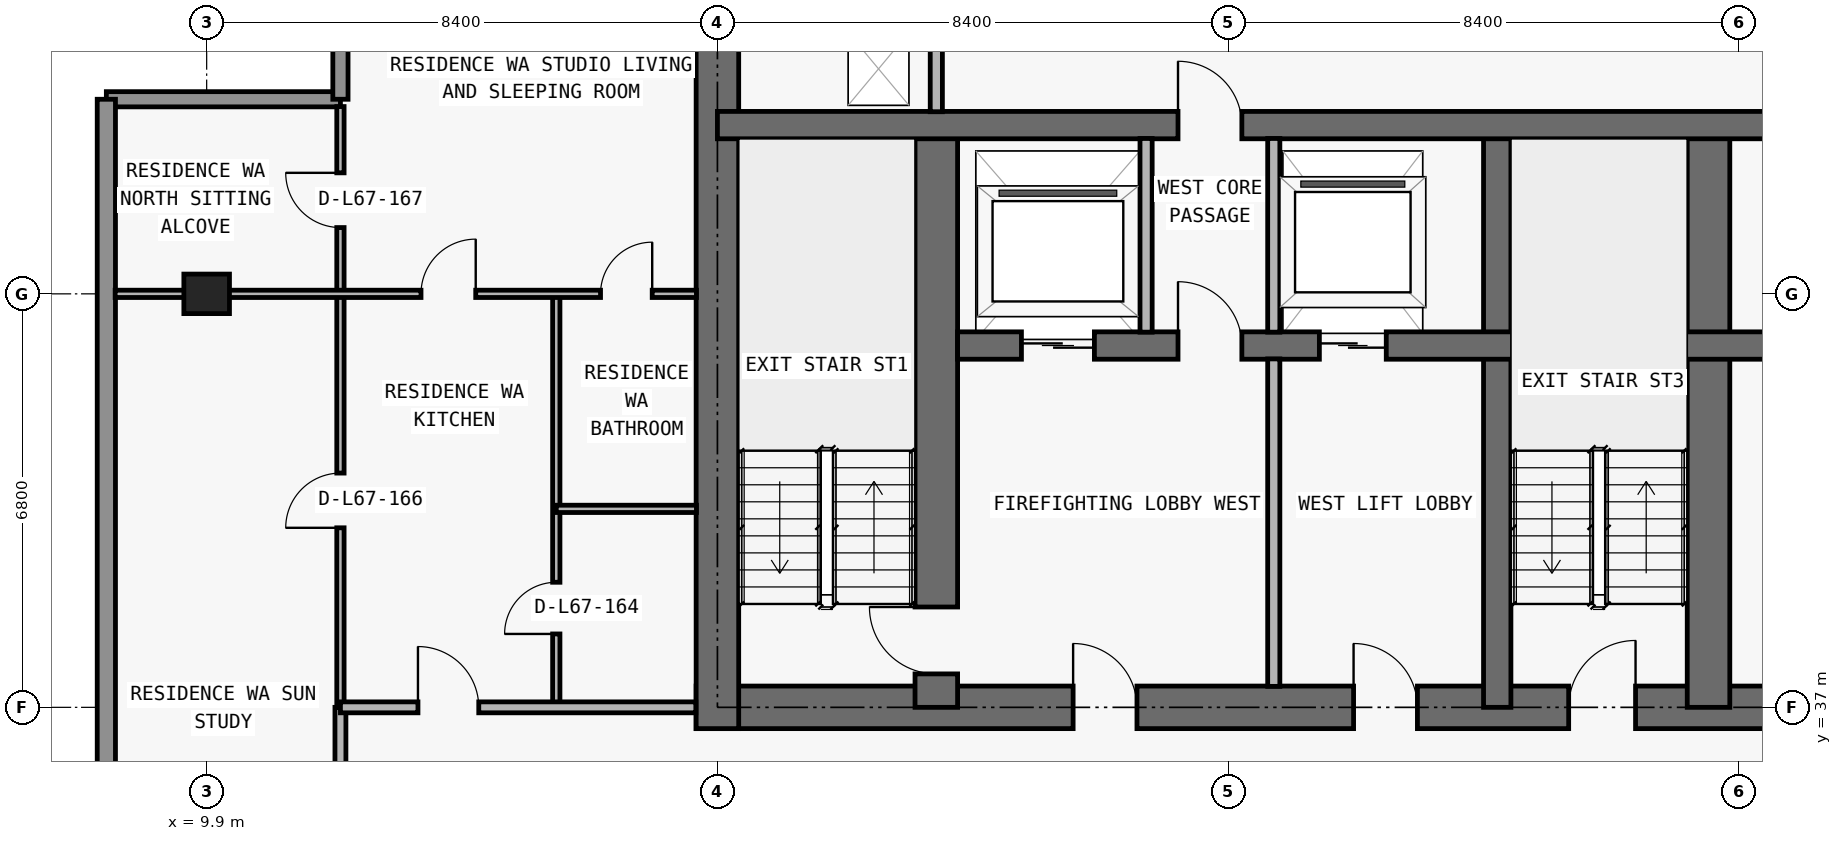
"""IFC4 building model, lengths in metres.
Left out: names, types, materials, properties, quantities, classifications, styles, units other than length and angle.
Written with IfcOpenShell. Run it as: python <this file> out.ifc"""

import sys

from ifc_helpers import new_model, si_unit, direction, frame, frame_2d, origin, origin_2d, place, context, subcontext, project, spatial, rectangle, extrude, element, fill, save


model = new_model("IFC4")
c1 = context("Model", 3, precision=1e-05, world=origin(), true_north=direction((0.0, 1.0)))
c2 = subcontext(c1, "Body", "Model", "MODEL_VIEW")
j1 = project(units=[si_unit("LENGTHUNIT", "METRE"), si_unit("PLANEANGLEUNIT", "RADIAN")], contexts=[c1])
p1 = place(None, origin())
s1 = spatial("IfcSite", under=j1, at=p1, CompositionType="ELEMENT")
p2 = place(p1, origin())
s2 = spatial("IfcBuilding", under=s1, at=p2, CompositionType="ELEMENT")
p3 = place(p2, frame((0.0, 0.0, 239.7)))
s3 = spatial("IfcBuildingStorey", under=s2, at=p3, CompositionType="ELEMENT", Elevation=239.7)
p4 = place(p3, frame((9.9, 43.8, 0.0), z_axis=(0.0, 0.0, 1.0), x_axis=(1.0, 0.0, 0.0)))
e1 = element("IfcColumn", 1, at=p4, inside=s3, PredefinedType="COLUMN", context=c2, shape_type="SweptSolid", body=[
    extrude(rectangle(XDim=0.75, YDim=0.65, at=origin_2d()), origin(), (0.0, 0.0, 1.0), 3.05),
])
p5 = place(p3, frame((17.95, 37.0, 0.0), z_axis=(0.0, 0.0, 1.0), x_axis=(1.0, 0.0, 0.0)))
e2 = element("IfcWall", 2, at=p5, inside=s3, PredefinedType="SHEAR", context=c2, shape_type="SweptSolid", body=[
    extrude(rectangle(XDim=41.9, YDim=0.7, at=frame_2d((20.95, 0.0))), origin(), (0.0, 0.0, 1.0), 3.05),
])
p6 = place(p5, frame((14.35, 0.0, 0.0)))
e3 = element("IfcOpeningElement", 3, at=p6, cuts=e2, PredefinedType="OPENING", context=c2, shape_type="SweptSolid", body=[
    extrude(rectangle(XDim=1.1, YDim=2.15, at=frame_2d((0.55, 1.075))), frame((0.0, 0.36, 0.0), z_axis=(0.0, -1.0, 0.0), x_axis=(1.0, 0.0, 0.0)), (0.0, 0.0, 1.0), 0.72),
])
p7 = place(p5, frame((6.2, 0.0, 0.0)))
e4 = element("IfcOpeningElement", 4, at=p7, cuts=e2, PredefinedType="OPENING", context=c2, shape_type="SweptSolid", body=[
    extrude(rectangle(XDim=1.05, YDim=2.15, at=frame_2d((0.525, 1.075))), frame((0.0, 0.36, 0.0), z_axis=(0.0, -1.0, 0.0), x_axis=(1.0, 0.0, 0.0)), (0.0, 0.0, 1.0), 0.72),
])
p8 = place(p5, frame((34.7, 0.0, 0.0)))
e5 = element("IfcOpeningElement", 5, at=p8, cuts=e2, PredefinedType="OPENING", context=c2, shape_type="SweptSolid", body=[
    extrude(rectangle(XDim=1.05, YDim=2.15, at=frame_2d((0.525, 1.075))), frame((0.0, 0.36, 0.0), z_axis=(0.0, -1.0, 0.0), x_axis=(1.0, 0.0, 0.0)), (0.0, 0.0, 1.0), 0.72),
])
p9 = place(p5, frame((10.812, 0.0, 0.0)))
e6 = element("IfcOpeningElement", 6, at=p9, cuts=e2, PredefinedType="OPENING", context=c2, shape_type="SweptSolid", body=[
    extrude(rectangle(XDim=1.05, YDim=2.15, at=frame_2d((0.525, 1.075))), frame((0.0, 0.36, 0.0), z_axis=(0.0, -1.0, 0.0), x_axis=(1.0, 0.0, 0.0)), (0.0, 0.0, 1.0), 0.72),
])
p10 = place(p5, frame((24.05, 0.0, 0.0)))
e7 = element("IfcOpeningElement", 7, at=p10, cuts=e2, PredefinedType="OPENING", context=c2, shape_type="SweptSolid", body=[
    extrude(rectangle(XDim=1.05, YDim=2.15, at=frame_2d((0.525, 1.075))), frame((0.0, 0.36, 0.0), z_axis=(0.0, -1.0, 0.0), x_axis=(1.0, 0.0, 0.0)), (0.0, 0.0, 1.0), 0.72),
])
p11 = place(p3, frame((18.3, 36.65, 0.0), z_axis=(0.0, 0.0, 1.0), x_axis=(0.0, 1.0, 0.0)))
e8 = element("IfcWall", 8, at=p11, inside=s3, PredefinedType="SHEAR", context=c2, shape_type="SweptSolid", body=[
    extrude(rectangle(XDim=13.95, YDim=0.7, at=frame_2d((6.975, 0.0))), origin(), (0.0, 0.0, 1.0), 3.05),
])
p12 = place(p3, frame((21.9, 37.0, 0.0), z_axis=(0.0, 0.0, 1.0), x_axis=(0.0, 1.0, 0.0)))
e9 = element("IfcWall", 9, at=p12, inside=s3, PredefinedType="SHEAR", context=c2, shape_type="SweptSolid", body=[
    extrude(rectangle(XDim=9.575, YDim=0.7, at=frame_2d((4.788, 0.0))), origin(), (0.0, 0.0, 1.0), 3.05),
])
p13 = place(p12, frame((0.55, 0.0, 0.0)))
e10 = element("IfcOpeningElement", 10, at=p13, cuts=e9, PredefinedType="OPENING", context=c2, shape_type="SweptSolid", body=[
    extrude(rectangle(XDim=1.1, YDim=2.15, at=frame_2d((0.55, 1.075))), frame((0.0, 0.36, 0.0), z_axis=(0.0, -1.0, 0.0), x_axis=(1.0, 0.0, 0.0)), (0.0, 0.0, 1.0), 0.72),
])
p14 = place(p3, frame((31.125, 37.0, 0.0), z_axis=(0.0, 0.0, 1.0), x_axis=(0.0, 1.0, 0.0)))
e11 = element("IfcWall", 11, at=p14, inside=s3, PredefinedType="SHEAR", context=c2, shape_type="SweptSolid", body=[
    extrude(rectangle(XDim=9.575, YDim=0.45, at=frame_2d((4.788, 0.0))), origin(), (0.0, 0.0, 1.0), 3.05),
])
p15 = place(p3, frame((34.6, 37.0, 0.0), z_axis=(0.0, 0.0, 1.0), x_axis=(0.0, 1.0, 0.0)))
e12 = element("IfcWall", 12, at=p15, inside=s3, PredefinedType="SHEAR", context=c2, shape_type="SweptSolid", body=[
    extrude(rectangle(XDim=9.575, YDim=0.7, at=frame_2d((4.788, 0.0))), origin(), (0.0, 0.0, 1.0), 3.05),
])
p16 = place(p3, frame((22.25, 42.95, 0.0), z_axis=(0.0, 0.0, 1.0), x_axis=(1.0, 0.0, 0.0)))
e13 = element("IfcWall", 13, at=p16, inside=s3, PredefinedType="SHEAR", context=c2, shape_type="SweptSolid", body=[
    extrude(rectangle(XDim=33.3, YDim=0.45, at=frame_2d((16.65, 0.0))), origin(), (0.0, 0.0, 1.0), 3.05),
])
p17 = place(p16, frame((1.05, 0.0, 0.0)))
e14 = element("IfcOpeningElement", 14, at=p17, cuts=e13, PredefinedType="OPENING", context=c2, shape_type="SweptSolid", body=[
    extrude(rectangle(XDim=1.2, YDim=2.2, at=frame_2d((0.6, 1.1))), frame((0.0, 0.235, 0.0), z_axis=(0.0, -1.0, 0.0), x_axis=(1.0, 0.0, 0.0)), (0.0, 0.0, 1.0), 0.47),
])
p18 = place(p16, frame((31.05, 0.0, 0.0)))
e15 = element("IfcOpeningElement", 15, at=p18, cuts=e13, PredefinedType="OPENING", context=c2, shape_type="SweptSolid", body=[
    extrude(rectangle(XDim=1.2, YDim=2.2, at=frame_2d((0.6, 1.1))), frame((0.0, 0.235, 0.0), z_axis=(0.0, -1.0, 0.0), x_axis=(1.0, 0.0, 0.0)), (0.0, 0.0, 1.0), 0.47),
])
p19 = place(p16, frame((26.45, 0.0, 0.0)))
e16 = element("IfcOpeningElement", 16, at=p19, cuts=e13, PredefinedType="OPENING", context=c2, shape_type="SweptSolid", body=[
    extrude(rectangle(XDim=1.1, YDim=2.2, at=frame_2d((0.55, 1.1))), frame((0.0, 0.235, 0.0), z_axis=(0.0, -1.0, 0.0), x_axis=(1.0, 0.0, 0.0)), (0.0, 0.0, 1.0), 0.47),
])
p20 = place(p16, frame((5.95, 0.0, 0.0)))
e17 = element("IfcOpeningElement", 17, at=p20, cuts=e13, PredefinedType="OPENING", context=c2, shape_type="SweptSolid", body=[
    extrude(rectangle(XDim=1.1, YDim=2.2, at=frame_2d((0.55, 1.1))), frame((0.0, 0.235, 0.0), z_axis=(0.0, -1.0, 0.0), x_axis=(1.0, 0.0, 0.0)), (0.0, 0.0, 1.0), 0.47),
])
p21 = place(p16, frame((3.625, 0.0, 0.0)))
e18 = element("IfcOpeningElement", 18, at=p21, cuts=e13, PredefinedType="OPENING", context=c2, shape_type="SweptSolid", body=[
    extrude(rectangle(XDim=1.05, YDim=2.15, at=frame_2d((0.525, 1.075))), frame((0.0, 0.235, 0.0), z_axis=(0.0, -1.0, 0.0), x_axis=(1.0, 0.0, 0.0)), (0.0, 0.0, 1.0), 0.47),
])
p22 = place(p16, frame((28.675, 0.0, 0.0)))
e19 = element("IfcOpeningElement", 19, at=p22, cuts=e13, PredefinedType="OPENING", context=c2, shape_type="SweptSolid", body=[
    extrude(rectangle(XDim=1.05, YDim=2.15, at=frame_2d((0.525, 1.075))), frame((0.0, 0.235, 0.0), z_axis=(0.0, -1.0, 0.0), x_axis=(1.0, 0.0, 0.0)), (0.0, 0.0, 1.0), 0.47),
])
p23 = place(p16, frame((15.225, 0.0, 0.0)))
e20 = element("IfcOpeningElement", 20, at=p23, cuts=e13, PredefinedType="OPENING", context=c2, shape_type="SweptSolid", body=[
    extrude(rectangle(XDim=1.0, YDim=2.2, at=frame_2d((0.5, 1.1))), frame((0.0, 0.235, 0.0), z_axis=(0.0, -1.0, 0.0), x_axis=(1.0, 0.0, 0.0)), (0.0, 0.0, 1.0), 0.47),
])
p24 = place(p16, frame((21.975, 0.0, 0.0)))
e21 = element("IfcOpeningElement", 21, at=p24, cuts=e13, PredefinedType="OPENING", context=c2, shape_type="SweptSolid", body=[
    extrude(rectangle(XDim=1.0, YDim=2.2, at=frame_2d((0.5, 1.1))), frame((0.0, 0.235, 0.0), z_axis=(0.0, -1.0, 0.0), x_axis=(1.0, 0.0, 0.0)), (0.0, 0.0, 1.0), 0.47),
])
p25 = place(p3, frame((18.3, 46.575, 0.0), z_axis=(0.0, 0.0, 1.0), x_axis=(1.0, 0.0, 0.0)))
e22 = element("IfcWall", 22, at=p25, inside=s3, PredefinedType="SHEAR", context=c2, shape_type="SweptSolid", body=[
    extrude(rectangle(XDim=41.2, YDim=0.45, at=frame_2d((20.6, 0.0))), origin(), (0.0, 0.0, 1.0), 3.05),
])
p26 = place(p25, frame((7.575, 0.0, 0.0)))
e23 = element("IfcOpeningElement", 23, at=p26, cuts=e22, PredefinedType="OPENING", context=c2, shape_type="SweptSolid", body=[
    extrude(rectangle(XDim=1.05, YDim=2.15, at=frame_2d((0.525, 1.075))), frame((0.0, 0.235, 0.0), z_axis=(0.0, -1.0, 0.0), x_axis=(1.0, 0.0, 0.0)), (0.0, 0.0, 1.0), 0.47),
])
p27 = place(p25, frame((32.625, 0.0, 0.0)))
e24 = element("IfcOpeningElement", 24, at=p27, cuts=e22, PredefinedType="OPENING", context=c2, shape_type="SweptSolid", body=[
    extrude(rectangle(XDim=1.05, YDim=2.15, at=frame_2d((0.525, 1.075))), frame((0.0, 0.235, 0.0), z_axis=(0.0, -1.0, 0.0), x_axis=(1.0, 0.0, 0.0)), (0.0, 0.0, 1.0), 0.47),
])
p28 = place(p3, frame((8.25, 47.0, 0.0), z_axis=(0.0, 0.0, 1.0), x_axis=(1.0, 0.0, 0.0)))
e25 = element("IfcWall", 25, at=p28, inside=s3, PredefinedType="ELEMENTEDWALL", context=c2, shape_type="SweptSolid", body=[
    extrude(rectangle(XDim=3.85, YDim=0.25, at=frame_2d((1.925, 0.0))), origin(), (0.0, 0.0, 1.0), 3.05),
])
p29 = place(p3, frame((12.1, 47.0, 0.0), z_axis=(0.0, 0.0, 1.0), x_axis=(0.0, 1.0, 0.0)))
e26 = element("IfcWall", 26, at=p29, inside=s3, PredefinedType="ELEMENTEDWALL", context=c2, shape_type="SweptSolid", body=[
    extrude(rectangle(XDim=3.45, YDim=0.25, at=frame_2d((1.725, 0.0))), origin(), (0.0, 0.0, 1.0), 3.05),
])
p30 = place(p3, frame((8.25, 30.15, 0.0), z_axis=(0.0, 0.0, 1.0), x_axis=(0.0, 1.0, 0.0)))
e27 = element("IfcWall", 27, at=p30, inside=s3, PredefinedType="STANDARD", context=c2, shape_type="SweptSolid", body=[
    extrude(rectangle(XDim=16.85, YDim=0.3, at=frame_2d((8.425, 0.0))), origin(), (0.0, 0.0, 1.0), 3.05),
])
p31 = place(p3, frame((12.1, 34.005, 0.0), z_axis=(0.0, 0.0, 1.0), x_axis=(0.0, 1.0, 0.0)))
e28 = element("IfcWall", 28, at=p31, inside=s3, PredefinedType="PARTITIONING", context=c2, shape_type="SweptSolid", body=[
    extrude(rectangle(XDim=2.995, YDim=0.18, at=frame_2d((1.498, 0.0))), origin(), (0.0, 0.0, 1.0), 3.05),
])
p32 = place(p3, frame((12.1, 37.005, 0.0), z_axis=(0.0, 0.0, 1.0), x_axis=(0.0, 1.0, 0.0)))
e29 = element("IfcWall", 29, at=p32, inside=s3, PredefinedType="PARTITIONING", context=c2, shape_type="SweptSolid", body=[
    extrude(rectangle(XDim=9.875, YDim=0.12, at=frame_2d((4.938, 0.0))), origin(), (0.0, 0.0, 1.0), 3.05),
])
p33 = place(p32, frame((2.948, 0.0, 0.0)))
e30 = element("IfcOpeningElement", 30, at=p33, cuts=e29, PredefinedType="OPENING", context=c2, shape_type="SweptSolid", body=[
    extrude(rectangle(XDim=0.9, YDim=2.15, at=frame_2d((0.45, 1.075))), frame((0.0, 0.07, 0.0), z_axis=(0.0, -1.0, 0.0), x_axis=(1.0, 0.0, 0.0)), (0.0, 0.0, 1.0), 0.14),
])
p34 = place(p32, frame((7.885, 0.0, 0.0)))
e31 = element("IfcOpeningElement", 31, at=p34, cuts=e29, PredefinedType="OPENING", context=c2, shape_type="SweptSolid", body=[
    extrude(rectangle(XDim=0.9, YDim=2.15, at=frame_2d((0.45, 1.075))), frame((0.0, 0.07, 0.0), z_axis=(0.0, -1.0, 0.0), x_axis=(1.0, 0.0, 0.0)), (0.0, 0.0, 1.0), 0.14),
])
p35 = place(p3, frame((15.65, 37.0, 0.0), z_axis=(0.0, 0.0, 1.0), x_axis=(0.0, 1.0, 0.0)))
e32 = element("IfcWall", 32, at=p35, inside=s3, PredefinedType="PARTITIONING", context=c2, shape_type="SweptSolid", body=[
    extrude(rectangle(XDim=6.8, YDim=0.12, at=frame_2d((3.4, 0.0))), origin(), (0.0, 0.0, 1.0), 3.05),
])
p36 = place(p35, frame((1.207, 0.0, 0.0)))
e33 = element("IfcOpeningElement", 33, at=p36, cuts=e32, PredefinedType="OPENING", context=c2, shape_type="SweptSolid", body=[
    extrude(rectangle(XDim=0.85, YDim=2.1, at=frame_2d((0.425, 1.05))), frame((0.0, 0.07, 0.0), z_axis=(0.0, -1.0, 0.0), x_axis=(1.0, 0.0, 0.0)), (0.0, 0.0, 1.0), 0.14),
])
p37 = place(p3, frame((21.9, 46.795, 0.0), z_axis=(0.0, 0.0, 1.0), x_axis=(0.0, 1.0, 0.0)))
e34 = element("IfcWall", 34, at=p37, inside=s3, PredefinedType="PARTITIONING", context=c2, shape_type="SweptSolid", body=[
    extrude(rectangle(XDim=3.16, YDim=0.2, at=frame_2d((1.58, 0.0))), origin(), (0.0, 0.0, 1.0), 3.05),
])
p38 = place(p3, frame((25.35, 43.17, 0.0), z_axis=(0.0, 0.0, 1.0), x_axis=(0.0, 1.0, 0.0)))
e35 = element("IfcWall", 35, at=p38, inside=s3, PredefinedType="PARTITIONING", context=c2, shape_type="SweptSolid", body=[
    extrude(rectangle(XDim=3.185, YDim=0.2, at=frame_2d((1.593, 0.0))), origin(), (0.0, 0.0, 1.0), 3.05),
])
p39 = place(p3, frame((27.45, 37.345, 0.0), z_axis=(0.0, 0.0, 1.0), x_axis=(0.0, 1.0, 0.0)))
e36 = element("IfcWall", 36, at=p39, inside=s3, PredefinedType="PARTITIONING", context=c2, shape_type="SweptSolid", body=[
    extrude(rectangle(XDim=5.385, YDim=0.2, at=frame_2d((2.692, 0.0))), origin(), (0.0, 0.0, 1.0), 3.05),
])
p40 = place(p3, frame((27.45, 43.17, 0.0), z_axis=(0.0, 0.0, 1.0), x_axis=(0.0, 1.0, 0.0)))
e37 = element("IfcWall", 37, at=p40, inside=s3, PredefinedType="PARTITIONING", context=c2, shape_type="SweptSolid", body=[
    extrude(rectangle(XDim=3.185, YDim=0.2, at=frame_2d((1.593, 0.0))), origin(), (0.0, 0.0, 1.0), 3.05),
])
p41 = place(p3, frame((12.1, 37.0, 0.0), z_axis=(0.0, 0.0, 1.0), x_axis=(1.0, 0.0, 0.0)))
e38 = element("IfcWall", 38, at=p41, inside=s3, PredefinedType="PARTITIONING", context=c2, shape_type="SweptSolid", body=[
    extrude(rectangle(XDim=5.845, YDim=0.18, at=frame_2d((2.922, 0.0))), origin(), (0.0, 0.0, 1.0), 3.05),
])
p42 = place(p41, frame((1.275, 0.0, 0.0)))
e39 = element("IfcOpeningElement", 39, at=p42, cuts=e38, PredefinedType="OPENING", context=c2, shape_type="SweptSolid", body=[
    extrude(rectangle(XDim=1.0, YDim=2.2, at=frame_2d((0.5, 1.1))), frame((0.0, 0.1, 0.0), z_axis=(0.0, -1.0, 0.0), x_axis=(1.0, 0.0, 0.0)), (0.0, 0.0, 1.0), 0.2),
])
p43 = place(p3, frame((15.65, 40.264, 0.0), z_axis=(0.0, 0.0, 1.0), x_axis=(1.0, 0.0, 0.0)))
e40 = element("IfcWall", 40, at=p43, inside=s3, PredefinedType="PARTITIONING", context=c2, shape_type="SweptSolid", body=[
    extrude(rectangle(XDim=2.305, YDim=0.12, at=frame_2d((1.153, 0.0))), origin(), (0.0, 0.0, 1.0), 3.05),
])
p44 = place(p3, frame((8.395, 43.8, 0.0), z_axis=(0.0, 0.0, 1.0), x_axis=(1.0, 0.0, 0.0)))
e41 = element("IfcWall", 41, at=p44, inside=s3, PredefinedType="PARTITIONING", context=c2, shape_type="SweptSolid", body=[
    extrude(rectangle(XDim=9.56, YDim=0.12, at=frame_2d((4.78, 0.0))), origin(), (0.0, 0.0, 1.0), 2.418),
])
p45 = place(p44, frame((5.03, 0.0, 0.0)))
e42 = element("IfcOpeningElement", 42, at=p45, cuts=e41, PredefinedType="OPENING", context=c2, shape_type="SweptSolid", body=[
    extrude(rectangle(XDim=0.9, YDim=2.15, at=frame_2d((0.45, 1.075))), frame((0.0, 0.07, 0.0), z_axis=(0.0, -1.0, 0.0), x_axis=(1.0, 0.0, 0.0)), (0.0, 0.0, 1.0), 0.14),
])
p46 = place(p44, frame((7.982, 0.0, 0.0)))
e43 = element("IfcOpeningElement", 43, at=p46, cuts=e41, PredefinedType="OPENING", context=c2, shape_type="SweptSolid", body=[
    extrude(rectangle(XDim=0.85, YDim=2.1, at=frame_2d((0.425, 1.05))), frame((0.0, 0.07, 0.0), z_axis=(0.0, -1.0, 0.0), x_axis=(1.0, 0.0, 0.0)), (0.0, 0.0, 1.0), 0.14),
])
p47 = place(p17, origin())
e44 = element("IfcDoor", 44, at=p47, inside=s3, OperationType="DOUBLE_DOOR_SLIDING", PredefinedType="DOOR", context=c2, shape_type="SweptSolid", body=[
    extrude(rectangle(XDim=1.2, YDim=2.2, at=frame_2d((0.6, 1.1))), frame((0.0, 0.025, 0.0), z_axis=(0.0, -1.0, 0.0), x_axis=(1.0, 0.0, 0.0)), (0.0, 0.0, 1.0), 0.05),
])
fill(e14, e44)
p48 = place(p20, origin())
e45 = element("IfcDoor", 45, at=p48, inside=s3, OperationType="DOUBLE_DOOR_SLIDING", PredefinedType="DOOR", context=c2, shape_type="SweptSolid", body=[
    extrude(rectangle(XDim=1.1, YDim=2.2, at=frame_2d((0.55, 1.1))), frame((0.0, 0.025, 0.0), z_axis=(0.0, -1.0, 0.0), x_axis=(1.0, 0.0, 0.0)), (0.0, 0.0, 1.0), 0.05),
])
fill(e17, e45)
p49 = place(p6, origin())
e46 = element("IfcDoor", 46, at=p49, inside=s3, OperationType="SINGLE_SWING_RIGHT", PredefinedType="DOOR", context=c2, shape_type="SweptSolid", body=[
    extrude(rectangle(XDim=1.1, YDim=2.15, at=frame_2d((0.55, 1.075))), frame((0.0, 0.025, 0.0), z_axis=(0.0, -1.0, 0.0), x_axis=(1.0, 0.0, 0.0)), (0.0, 0.0, 1.0), 0.05),
])
fill(e3, e46)
p50 = place(p7, origin())
e47 = element("IfcDoor", 47, at=p50, inside=s3, OperationType="SINGLE_SWING_LEFT", PredefinedType="DOOR", context=c2, shape_type="SweptSolid", body=[
    extrude(rectangle(XDim=1.05, YDim=2.15, at=frame_2d((0.525, 1.075))), frame((0.0, 0.025, 0.0), z_axis=(0.0, -1.0, 0.0), x_axis=(1.0, 0.0, 0.0)), (0.0, 0.0, 1.0), 0.05),
])
fill(e4, e47)
p51 = place(p13, origin())
e48 = element("IfcDoor", 48, at=p51, inside=s3, OperationType="SINGLE_SWING_RIGHT", PredefinedType="DOOR", context=c2, shape_type="SweptSolid", body=[
    extrude(rectangle(XDim=1.1, YDim=2.15, at=frame_2d((0.55, 1.075))), frame((0.0, 0.025, 0.0), z_axis=(0.0, -1.0, 0.0), x_axis=(1.0, 0.0, 0.0)), (0.0, 0.0, 1.0), 0.05),
])
fill(e10, e48)
p52 = place(p21, origin())
e49 = element("IfcDoor", 49, at=p52, inside=s3, OperationType="SINGLE_SWING_LEFT", PredefinedType="DOOR", context=c2, shape_type="SweptSolid", body=[
    extrude(rectangle(XDim=1.05, YDim=2.15, at=frame_2d((0.525, 1.075))), frame((0.0, 0.025, 0.0), z_axis=(0.0, -1.0, 0.0), x_axis=(1.0, 0.0, 0.0)), (0.0, 0.0, 1.0), 0.05),
])
fill(e18, e49)
p53 = place(p9, origin())
e50 = element("IfcDoor", 50, at=p53, inside=s3, OperationType="SINGLE_SWING_LEFT", PredefinedType="DOOR", context=c2, shape_type="SweptSolid", body=[
    extrude(rectangle(XDim=1.05, YDim=2.15, at=frame_2d((0.525, 1.075))), frame((0.0, 0.025, 0.0), z_axis=(0.0, -1.0, 0.0), x_axis=(1.0, 0.0, 0.0)), (0.0, 0.0, 1.0), 0.05),
])
fill(e6, e50)
p54 = place(p26, origin())
e51 = element("IfcDoor", 51, at=p54, inside=s3, OperationType="SINGLE_SWING_LEFT", PredefinedType="DOOR", context=c2, shape_type="SweptSolid", body=[
    extrude(rectangle(XDim=1.05, YDim=2.15, at=frame_2d((0.525, 1.075))), frame((0.0, 0.025, 0.0), z_axis=(0.0, -1.0, 0.0), x_axis=(1.0, 0.0, 0.0)), (0.0, 0.0, 1.0), 0.05),
])
fill(e23, e51)
p55 = place(p42, origin())
e52 = element("IfcDoor", 52, at=p55, inside=s3, OperationType="SINGLE_SWING_LEFT", PredefinedType="DOOR", context=c2, shape_type="SweptSolid", body=[
    extrude(rectangle(XDim=1.0, YDim=2.2, at=frame_2d((0.5, 1.1))), frame((0.0, 0.025, 0.0), z_axis=(0.0, -1.0, 0.0), x_axis=(1.0, 0.0, 0.0)), (0.0, 0.0, 1.0), 0.05),
])
fill(e39, e52)
p56 = place(p45, origin())
e53 = element("IfcDoor", 53, at=p56, inside=s3, OperationType="SINGLE_SWING_RIGHT", PredefinedType="DOOR", context=c2, shape_type="SweptSolid", body=[
    extrude(rectangle(XDim=0.9, YDim=2.15, at=frame_2d((0.45, 1.075))), frame((0.0, 0.025, 0.0), z_axis=(0.0, -1.0, 0.0), x_axis=(1.0, 0.0, 0.0)), (0.0, 0.0, 1.0), 0.05),
])
fill(e42, e53)
p57 = place(p36, origin())
e54 = element("IfcDoor", 54, at=p57, inside=s3, OperationType="SINGLE_SWING_LEFT", PredefinedType="DOOR", context=c2, shape_type="SweptSolid", body=[
    extrude(rectangle(XDim=0.85, YDim=2.1, at=frame_2d((0.425, 1.05))), frame((0.0, 0.025, 0.0), z_axis=(0.0, -1.0, 0.0), x_axis=(1.0, 0.0, 0.0)), (0.0, 0.0, 1.0), 0.05),
])
fill(e33, e54)
p58 = place(p46, origin())
e55 = element("IfcDoor", 55, at=p58, inside=s3, OperationType="SINGLE_SWING_RIGHT", PredefinedType="DOOR", context=c2, shape_type="SweptSolid", body=[
    extrude(rectangle(XDim=0.85, YDim=2.1, at=frame_2d((0.425, 1.05))), frame((0.0, 0.025, 0.0), z_axis=(0.0, -1.0, 0.0), x_axis=(1.0, 0.0, 0.0)), (0.0, 0.0, 1.0), 0.05),
])
fill(e43, e55)
p59 = place(p33, origin())
e56 = element("IfcDoor", 56, at=p59, inside=s3, OperationType="SINGLE_SWING_LEFT", PredefinedType="DOOR", context=c2, shape_type="SweptSolid", body=[
    extrude(rectangle(XDim=0.9, YDim=2.15, at=frame_2d((0.45, 1.075))), frame((0.0, 0.025, 0.0), z_axis=(0.0, -1.0, 0.0), x_axis=(1.0, 0.0, 0.0)), (0.0, 0.0, 1.0), 0.05),
])
fill(e30, e56)
p60 = place(p34, origin())
e57 = element("IfcDoor", 57, at=p60, inside=s3, OperationType="SINGLE_SWING_RIGHT", PredefinedType="DOOR", context=c2, shape_type="SweptSolid", body=[
    extrude(rectangle(XDim=0.9, YDim=2.15, at=frame_2d((0.45, 1.075))), frame((0.0, 0.025, 0.0), z_axis=(0.0, -1.0, 0.0), x_axis=(1.0, 0.0, 0.0)), (0.0, 0.0, 1.0), 0.05),
])
fill(e31, e57)
save(model, sys.argv[1])
